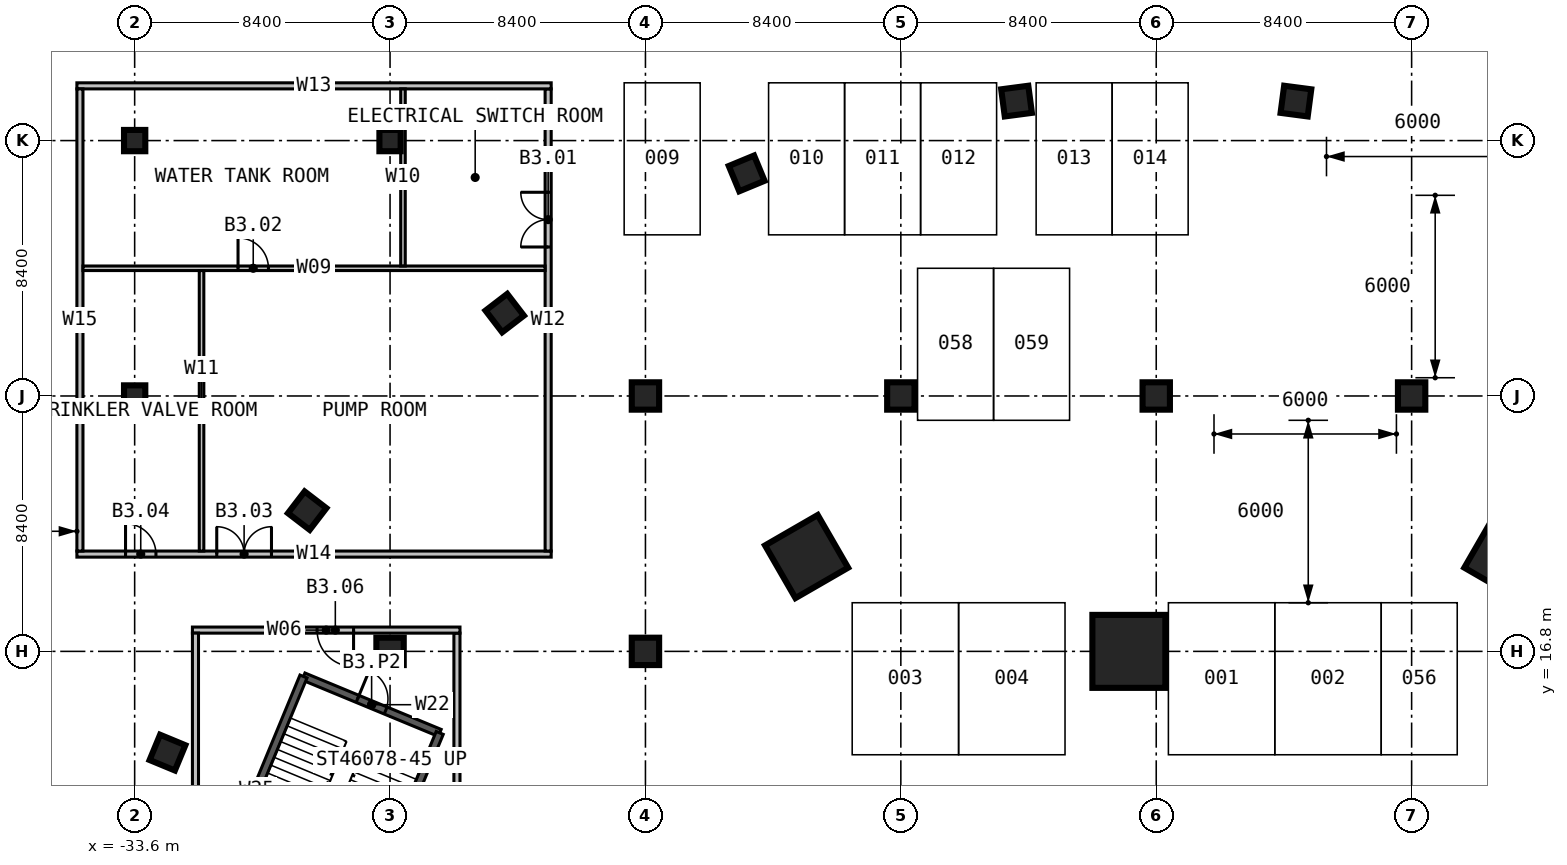
"""IFC4 building model, lengths in metres.
Left out: names, types, materials, properties, quantities, classifications, styles, units other than length and angle.
Written with IfcOpenShell. Run it as: python <this file> out.ifc"""

import sys

from ifc_helpers import new_model, si_unit, direction, frame, frame_2d, origin, origin_2d, place, context, subcontext, project, spatial, rectangle, hollow_rectangle, extrude, element, fill, save


model = new_model("IFC4")
c1 = context("Model", 3, precision=1e-05, world=origin(), true_north=direction((0.0, 1.0)))
c2 = subcontext(c1, "Body", "Model", "MODEL_VIEW")
j1 = project(units=[si_unit("LENGTHUNIT", "METRE"), si_unit("PLANEANGLEUNIT", "RADIAN")], contexts=[c1])
p1 = place(None, origin())
s1 = spatial("IfcSite", under=j1, at=p1, CompositionType="ELEMENT")
p2 = place(p1, origin())
s2 = spatial("IfcBuilding", under=s1, at=p2, CompositionType="ELEMENT")
p3 = place(p2, frame((0.0, 0.0, -13.5)))
s3 = spatial("IfcBuildingStorey", under=s2, at=p3, CompositionType="ELEMENT", Elevation=-13.5)
for number, where, z_axis, x_axis in (
    (1, (-25.2, 16.8, 0.0), (0.0, 0.0, 1.0), (1.0, 0.0, 0.0)),
    (2, (-16.8, 16.8, 0.0), (0.0, 0.0, 1.0), (1.0, 0.0, 0.0)),
    (3, (-16.8, 25.2, 0.0), (0.0, 0.0, 1.0), (1.0, 0.0, 0.0)),
    (4, (-8.4, 25.2, 0.0), (0.0, 0.0, 1.0), (1.0, 0.0, 0.0)),
):
    element("IfcColumn", number, at=place(p3, frame(where, z_axis=z_axis, x_axis=x_axis)), inside=s3, PredefinedType="COLUMN", context=c2, shape_type="SweptSolid", body=[
        extrude(rectangle(XDim=0.9, YDim=0.9, at=origin_2d()), origin(), (0.0, 0.0, 1.0), 4.5),
    ])
p4 = place(p3, frame((-0.9, 16.8, 0.0), z_axis=(0.0, 0.0, 1.0), x_axis=(1.0, 0.0, 0.0)))
e5 = element("IfcColumn", 5, at=p4, inside=s3, PredefinedType="COLUMN", context=c2, shape_type="SweptSolid", body=[
    extrude(rectangle(XDim=2.4, YDim=2.4, at=origin_2d()), origin(), (0.0, 0.0, 1.0), 4.5),
])
for number, where, z_axis, x_axis in (
    (6, (0.0, 25.2, 0.0), (0.0, 0.0, 1.0), (1.0, 0.0, 0.0)),
    (7, (8.4, 25.2, 0.0), (0.0, 0.0, 1.0), (1.0, 0.0, 0.0)),
):
    element("IfcColumn", number, at=place(p3, frame(where, z_axis=z_axis, x_axis=x_axis)), inside=s3, PredefinedType="COLUMN", context=c2, shape_type="SweptSolid", body=[
        extrude(rectangle(XDim=0.9, YDim=0.9, at=origin_2d()), origin(), (0.0, 0.0, 1.0), 4.5),
    ])
for number, where, z_axis, x_axis in (
    (8, (-33.6, 25.2, 0.0), (0.0, 0.0, 1.0), (1.0, 0.0, 0.0)),
    (9, (-33.6, 33.6, 0.0), (0.0, 0.0, 1.0), (1.0, 0.0, 0.0)),
    (10, (-25.2, 33.6, 0.0), (0.0, 0.0, 1.0), (1.0, 0.0, 0.0)),
):
    element("IfcColumn", number, at=place(p3, frame(where, z_axis=z_axis, x_axis=x_axis)), inside=s3, PredefinedType="COLUMN", context=c2, shape_type="SweptSolid", body=[
        extrude(rectangle(XDim=0.7, YDim=0.7, at=origin_2d()), origin(), (0.0, 0.0, 1.0), 4.5),
    ])
for number, where, z_axis, x_axis in (
    (11, (4.594, 34.899, 0.0), (0.0, 0.0, 1.0), (0.131, 0.991, 0.0)),
    (12, (-4.594, 34.899, 0.0), (0.0, 0.0, 1.0), (-0.131, 0.991, 0.0)),
    (13, (-13.47, 32.521, 0.0), (0.0, 0.0, 1.0), (-0.383, 0.924, 0.0)),
    (14, (-21.428, 27.926, 0.0), (0.0, 0.0, 1.0), (-0.609, 0.793, 0.0)),
    (15, (-27.926, 21.428, 0.0), (0.0, 0.0, 1.0), (-0.793, 0.609, 0.0)),
    (16, (-32.521, 13.47, 0.0), (0.0, 0.0, 1.0), (-0.924, 0.383, 0.0)),
):
    element("IfcColumn", number, at=place(p3, frame(where, z_axis=z_axis, x_axis=x_axis)), inside=s3, PredefinedType="COLUMN", context=c2, shape_type="SweptSolid", body=[
        extrude(rectangle(XDim=0.9, YDim=0.9, at=origin_2d()), origin(), (0.0, 0.0, 1.0), 4.5),
    ])
for number, where, z_axis, x_axis in (
    (17, (11.5, 19.919, 0.0), (0.0, 0.0, 1.0), (0.5, 0.866, 0.0)),
    (18, (-11.5, 19.919, 0.0), (0.0, 0.0, 1.0), (-0.5, 0.866, 0.0)),
):
    element("IfcColumn", number, at=place(p3, frame(where, z_axis=z_axis, x_axis=x_axis)), inside=s3, PredefinedType="COLUMN", context=c2, shape_type="SweptSolid", body=[
        extrude(hollow_rectangle(XDim=2.0, YDim=2.0, WallThickness=0.24, at=origin_2d()), origin(), (0.0, 0.0, 1.0), 4.5),
    ])
p5 = place(p3, frame((-28.047, 15.974, 0.0), z_axis=(0.0, 0.0, 1.0), x_axis=(0.923862828997, -0.382723755727, 0.0)))
e19 = element("IfcWall", 19, at=p5, inside=s3, PredefinedType="SOLIDWALL", context=c2, shape_type="SweptSolid", body=[
    extrude(rectangle(XDim=4.85, YDim=0.25, at=frame_2d((2.425, 0.0))), origin(), (0.0, 0.0, 1.0), 4.5),
])
p6 = place(p5, frame((1.925, 0.0, 0.0)))
e20 = element("IfcOpeningElement", 20, at=p6, cuts=e19, PredefinedType="OPENING", context=c2, shape_type="SweptSolid", body=[
    extrude(rectangle(XDim=1.0, YDim=2.2, at=frame_2d((0.5, 1.1))), frame((0.0, 0.135, 0.0), z_axis=(0.0, -1.0, 0.0), x_axis=(1.0, 0.0, 0.0)), (0.0, 0.0, 1.0), 0.27),
])
p7 = place(p3, frame((-23.566, 14.118, 0.0), z_axis=(0.0, 0.0, 1.0), x_axis=(-0.382689294869, -0.923877104161, 0.0)))
e21 = element("IfcWall", 21, at=p7, inside=s3, PredefinedType="SOLIDWALL", context=c2, shape_type="SweptSolid", body=[
    extrude(rectangle(XDim=8.05, YDim=0.25, at=frame_2d((4.025, 0.0))), origin(), (0.0, 0.0, 1.0), 4.5),
])
p8 = place(p3, frame((-31.127, 8.537, 0.0), z_axis=(0.0, 0.0, 1.0), x_axis=(0.382678572144, 0.923881545666, 0.0)))
e22 = element("IfcWall", 22, at=p8, inside=s3, PredefinedType="SOLIDWALL", context=c2, shape_type="SweptSolid", body=[
    extrude(rectangle(XDim=8.05, YDim=0.25, at=frame_2d((4.025, 0.0))), origin(), (0.0, 0.0, 1.0), 4.5),
])
p9 = place(p3, frame((-23.0, 6.4, 0.0), z_axis=(0.0, 0.0, 1.0), x_axis=(0.0, 1.0, 0.0)))
e23 = element("IfcWall", 23, at=p9, inside=s3, PredefinedType="PARTITIONING", context=c2, shape_type="SweptSolid", body=[
    extrude(rectangle(XDim=11.0, YDim=0.2, at=frame_2d((5.5, 0.0))), origin(), (0.0, 0.0, 1.0), 4.2),
])
p10 = place(p3, frame((-22.9, 17.5, 0.0), z_axis=(0.0, 0.0, 1.0), x_axis=(-1.0, 0.0, 0.0)))
e24 = element("IfcWall", 24, at=p10, inside=s3, PredefinedType="PARTITIONING", context=c2, shape_type="SweptSolid", body=[
    extrude(rectangle(XDim=8.8, YDim=0.2, at=frame_2d((4.4, 0.0))), origin(), (0.0, 0.0, 1.0), 4.2),
])
p11 = place(p10, frame((3.5, 0.0, 0.0)))
e25 = element("IfcOpeningElement", 25, at=p11, cuts=e24, PredefinedType="OPENING", context=c2, shape_type="SweptSolid", body=[
    extrude(rectangle(XDim=1.2, YDim=2.2, at=frame_2d((0.6, 1.1))), frame((0.0, 0.11, 0.0), z_axis=(0.0, -1.0, 0.0), x_axis=(1.0, 0.0, 0.0)), (0.0, 0.0, 1.0), 0.22),
])
p12 = place(p3, frame((-31.6, 17.4, 0.0), z_axis=(0.0, 0.0, 1.0), x_axis=(0.0, -1.0, 0.0)))
e26 = element("IfcWall", 26, at=p12, inside=s3, PredefinedType="PARTITIONING", context=c2, shape_type="SweptSolid", body=[
    extrude(rectangle(XDim=11.0, YDim=0.2, at=frame_2d((5.5, 0.0))), origin(), (0.0, 0.0, 1.0), 4.2),
])
p13 = place(p3, frame((-35.5, 20.0, 0.0), z_axis=(0.0, 0.0, 1.0), x_axis=(1.0, 0.0, 0.0)))
e27 = element("IfcWall", 27, at=p13, inside=s3, PredefinedType="PARTITIONING", context=c2, shape_type="SweptSolid", body=[
    extrude(rectangle(XDim=15.6, YDim=0.2, at=frame_2d((7.8, 0.0))), origin(), (0.0, 0.0, 1.0), 4.2),
])
p14 = place(p13, frame((4.6, 0.0, 0.0)))
e28 = element("IfcOpeningElement", 28, at=p14, cuts=e27, PredefinedType="OPENING", context=c2, shape_type="SweptSolid", body=[
    extrude(rectangle(XDim=1.8, YDim=2.4, at=frame_2d((0.9, 1.2))), frame((0.0, 0.11, 0.0), z_axis=(0.0, -1.0, 0.0), x_axis=(1.0, 0.0, 0.0)), (0.0, 0.0, 1.0), 0.22),
])
p15 = place(p13, frame((1.6, 0.0, 0.0)))
e29 = element("IfcOpeningElement", 29, at=p15, cuts=e27, PredefinedType="OPENING", context=c2, shape_type="SweptSolid", body=[
    extrude(rectangle(XDim=1.0, YDim=2.2, at=frame_2d((0.5, 1.1))), frame((0.0, 0.11, 0.0), z_axis=(0.0, -1.0, 0.0), x_axis=(1.0, 0.0, 0.0)), (0.0, 0.0, 1.0), 0.22),
])
p16 = place(p3, frame((-20.0, 20.1, 0.0), z_axis=(0.0, 0.0, 1.0), x_axis=(0.0, 1.0, 0.0)))
e30 = element("IfcWall", 30, at=p16, inside=s3, PredefinedType="PARTITIONING", context=c2, shape_type="SweptSolid", body=[
    extrude(rectangle(XDim=15.2, YDim=0.2, at=frame_2d((7.6, 0.0))), origin(), (0.0, 0.0, 1.0), 4.2),
])
p17 = place(p16, frame((10.0, 0.0, 0.0)))
e31 = element("IfcOpeningElement", 31, at=p17, cuts=e30, PredefinedType="OPENING", context=c2, shape_type="SweptSolid", body=[
    extrude(rectangle(XDim=1.8, YDim=2.4, at=frame_2d((0.9, 1.2))), frame((0.0, 0.11, 0.0), z_axis=(0.0, -1.0, 0.0), x_axis=(1.0, 0.0, 0.0)), (0.0, 0.0, 1.0), 0.22),
])
p18 = place(p3, frame((-19.9, 35.4, 0.0), z_axis=(0.0, 0.0, 1.0), x_axis=(-1.0, 0.0, 0.0)))
e32 = element("IfcWall", 32, at=p18, inside=s3, PredefinedType="PARTITIONING", context=c2, shape_type="SweptSolid", body=[
    extrude(rectangle(XDim=15.6, YDim=0.2, at=frame_2d((7.8, 0.0))), origin(), (0.0, 0.0, 1.0), 4.2),
])
p19 = place(p3, frame((-35.4, 35.3, 0.0), z_axis=(0.0, 0.0, 1.0), x_axis=(0.0, -1.0, 0.0)))
e33 = element("IfcWall", 33, at=p19, inside=s3, PredefinedType="PARTITIONING", context=c2, shape_type="SweptSolid", body=[
    extrude(rectangle(XDim=15.2, YDim=0.2, at=frame_2d((7.6, 0.0))), origin(), (0.0, 0.0, 1.0), 4.2),
])
p20 = place(p3, frame((-35.3, 29.4, 0.0), z_axis=(0.0, 0.0, 1.0), x_axis=(1.0, 0.0, 0.0)))
e34 = element("IfcWall", 34, at=p20, inside=s3, PredefinedType="PARTITIONING", context=c2, shape_type="SweptSolid", body=[
    extrude(rectangle(XDim=15.2, YDim=0.15, at=frame_2d((7.6, 0.0))), origin(), (0.0, 0.0, 1.0), 4.2),
])
p21 = place(p20, frame((5.1, 0.0, 0.0)))
e35 = element("IfcOpeningElement", 35, at=p21, cuts=e34, PredefinedType="OPENING", context=c2, shape_type="SweptSolid", body=[
    extrude(rectangle(XDim=1.0, YDim=2.2, at=frame_2d((0.5, 1.1))), frame((0.0, 0.085, 0.0), z_axis=(0.0, -1.0, 0.0), x_axis=(1.0, 0.0, 0.0)), (0.0, 0.0, 1.0), 0.17),
])
p22 = place(p3, frame((-31.4, 20.1, 0.0), z_axis=(0.0, 0.0, 1.0), x_axis=(0.0, 1.0, 0.0)))
e36 = element("IfcWall", 36, at=p22, inside=s3, PredefinedType="PARTITIONING", context=c2, shape_type="SweptSolid", body=[
    extrude(rectangle(XDim=9.225, YDim=0.15, at=frame_2d((4.612, 0.0))), origin(), (0.0, 0.0, 1.0), 4.2),
])
p23 = place(p3, frame((-24.775, 29.475, 0.0), z_axis=(0.0, 0.0, 1.0), x_axis=(0.0, 1.0, 0.0)))
e37 = element("IfcWall", 37, at=p23, inside=s3, PredefinedType="PARTITIONING", context=c2, shape_type="SweptSolid", body=[
    extrude(rectangle(XDim=5.825, YDim=0.15, at=frame_2d((2.913, 0.0))), origin(), (0.0, 0.0, 1.0), 4.2),
])
p24 = place(p6, origin())
e38 = element("IfcDoor", 38, at=p24, inside=s3, OperationType="SINGLE_SWING_LEFT", PredefinedType="DOOR", context=c2, shape_type="SweptSolid", body=[
    extrude(rectangle(XDim=1.0, YDim=2.2, at=frame_2d((0.5, 1.1))), frame((0.0, 0.025, 0.0), z_axis=(0.0, -1.0, 0.0), x_axis=(1.0, 0.0, 0.0)), (0.0, 0.0, 1.0), 0.05),
])
fill(e20, e38)
p25 = place(p11, origin())
e39 = element("IfcDoor", 39, at=p25, inside=s3, OperationType="SINGLE_SWING_LEFT", PredefinedType="DOOR", context=c2, shape_type="SweptSolid", body=[
    extrude(rectangle(XDim=1.2, YDim=2.2, at=frame_2d((0.6, 1.1))), frame((0.0, 0.025, 0.0), z_axis=(0.0, -1.0, 0.0), x_axis=(1.0, 0.0, 0.0)), (0.0, 0.0, 1.0), 0.05),
])
fill(e25, e39)
p26 = place(p14, origin())
e40 = element("IfcDoor", 40, at=p26, inside=s3, OperationType="DOUBLE_DOOR_SINGLE_SWING", PredefinedType="DOOR", context=c2, shape_type="SweptSolid", body=[
    extrude(rectangle(XDim=1.8, YDim=2.4, at=frame_2d((0.9, 1.2))), frame((0.0, 0.025, 0.0), z_axis=(0.0, -1.0, 0.0), x_axis=(1.0, 0.0, 0.0)), (0.0, 0.0, 1.0), 0.05),
])
fill(e28, e40)
p27 = place(p17, origin())
e41 = element("IfcDoor", 41, at=p27, inside=s3, OperationType="DOUBLE_DOOR_SINGLE_SWING", PredefinedType="DOOR", context=c2, shape_type="SweptSolid", body=[
    extrude(rectangle(XDim=1.8, YDim=2.4, at=frame_2d((0.9, 1.2))), frame((0.0, 0.025, 0.0), z_axis=(0.0, -1.0, 0.0), x_axis=(1.0, 0.0, 0.0)), (0.0, 0.0, 1.0), 0.05),
])
fill(e31, e41)
p28 = place(p15, origin())
e42 = element("IfcDoor", 42, at=p28, inside=s3, OperationType="SINGLE_SWING_LEFT", PredefinedType="DOOR", context=c2, shape_type="SweptSolid", body=[
    extrude(rectangle(XDim=1.0, YDim=2.2, at=frame_2d((0.5, 1.1))), frame((0.0, 0.025, 0.0), z_axis=(0.0, -1.0, 0.0), x_axis=(1.0, 0.0, 0.0)), (0.0, 0.0, 1.0), 0.05),
])
fill(e29, e42)
p29 = place(p21, origin())
e43 = element("IfcDoor", 43, at=p29, inside=s3, OperationType="SINGLE_SWING_LEFT", PredefinedType="DOOR", context=c2, shape_type="SweptSolid", body=[
    extrude(rectangle(XDim=1.0, YDim=2.2, at=frame_2d((0.5, 1.1))), frame((0.0, 0.025, 0.0), z_axis=(0.0, -1.0, 0.0), x_axis=(1.0, 0.0, 0.0)), (0.0, 0.0, 1.0), 0.05),
])
fill(e35, e43)
save(model, sys.argv[1])
